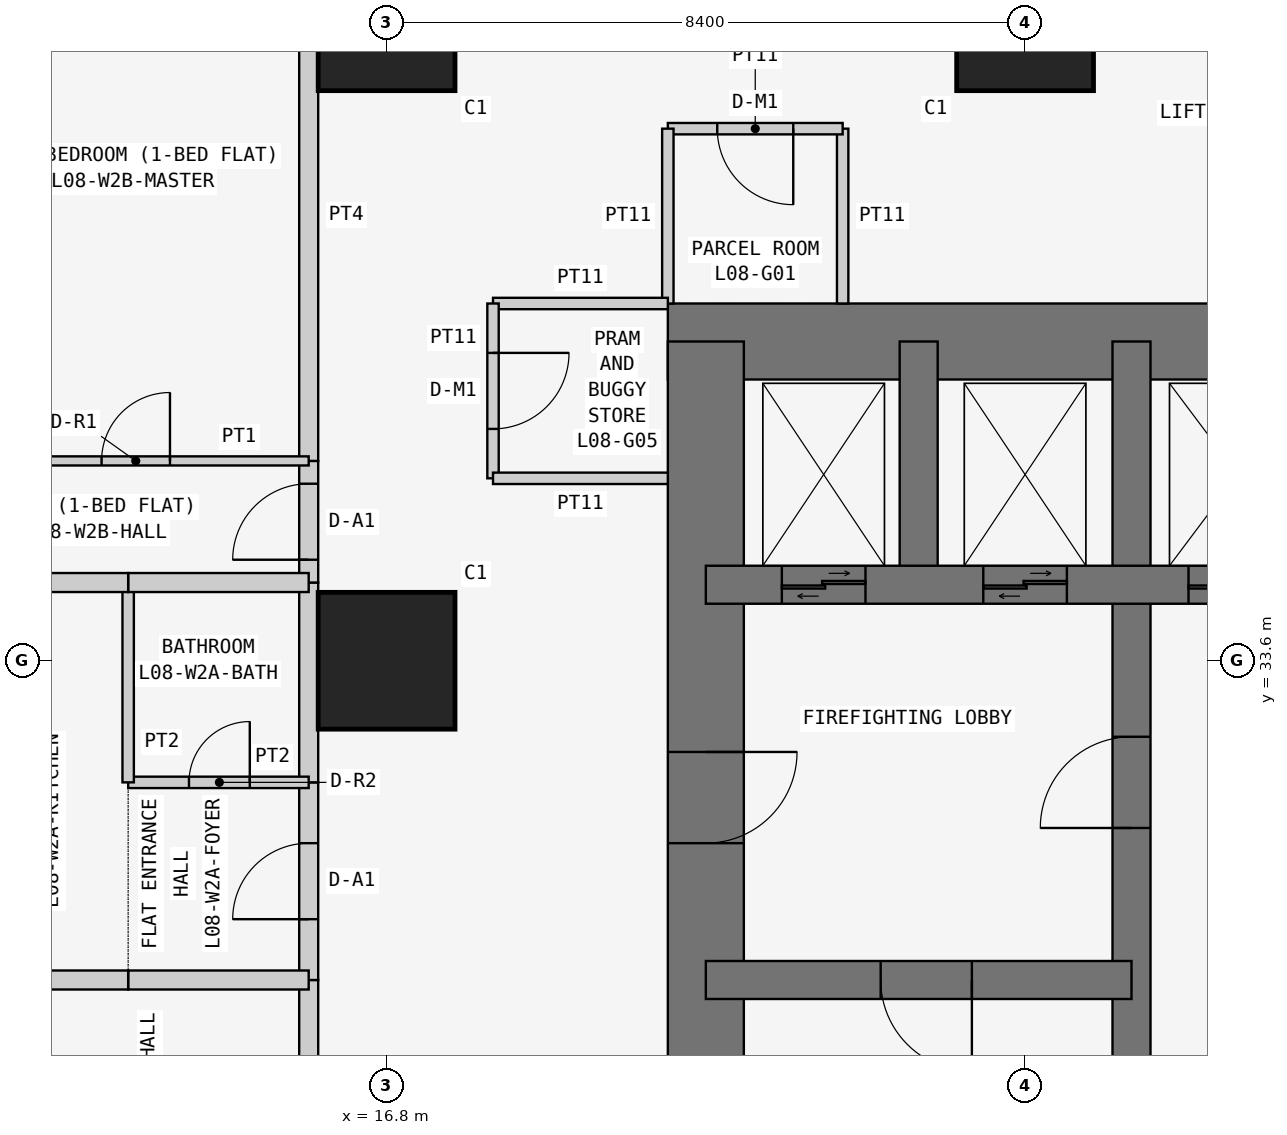
"""IFC4 building model, lengths in metres.
Left out: names, types, materials, properties, quantities, classifications, styles, units other than length and angle.
Written with IfcOpenShell. Run it as: python <this file> out.ifc"""

import sys

from ifc_helpers import new_model, si_unit, direction, frame, frame_2d, origin, origin_2d, place, context, subcontext, project, spatial, rectangle, extrude, element, fill, save


model = new_model("IFC4")
c1 = context("Model", 3, precision=1e-05, world=origin(), true_north=direction((0.0, 1.0)))
c2 = subcontext(c1, "Body", "Model", "MODEL_VIEW")
j1 = project(units=[si_unit("LENGTHUNIT", "METRE"), si_unit("PLANEANGLEUNIT", "RADIAN")], contexts=[c1])
p1 = place(None, origin())
s1 = spatial("IfcSite", under=j1, at=p1, CompositionType="ELEMENT")
p2 = place(p1, origin())
s2 = spatial("IfcBuilding", under=s1, at=p2, CompositionType="ELEMENT")
p3 = place(p2, frame((0.0, 0.0, 38.1)))
s3 = spatial("IfcBuildingStorey", under=s2, at=p3, CompositionType="ELEMENT", Elevation=38.1)
for number, where, z_axis, x_axis in (
    (1, (16.8, 33.6, 0.0), (0.0, 0.0, 1.0), (1.0, 0.0, 0.0)),
    (2, (16.8, 42.0, 0.0), (0.0, 0.0, 1.0), (1.0, 0.0, 0.0)),
    (3, (25.2, 42.0, 0.0), (0.0, 0.0, 1.0), (1.0, 0.0, 0.0)),
):
    element("IfcColumn", number, at=place(p3, frame(where, z_axis=z_axis, x_axis=x_axis)), inside=s3, PredefinedType="COLUMN", context=c2, shape_type="SweptSolid", body=[
        extrude(rectangle(XDim=1.8, YDim=1.8, at=origin_2d()), origin(), (0.0, 0.0, 1.0), 3.6),
    ])
p4 = place(p3, frame((37.8, 37.8, 0.0), z_axis=(0.0, 0.0, 1.0), x_axis=(-1.0, 0.0, 0.0)))
e4 = element("IfcWall", 4, at=p4, inside=s3, PredefinedType="SHEAR", context=c2, shape_type="SweptSolid", body=[
    extrude(rectangle(XDim=17.3, YDim=1.0, at=frame_2d((8.65, 0.0))), origin(), (0.0, 0.0, 1.0), 3.6),
])
p5 = place(p3, frame((21.0, 37.8, 0.0), z_axis=(0.0, 0.0, 1.0), x_axis=(0.0, -1.0, 0.0)))
e5 = element("IfcWall", 5, at=p5, inside=s3, PredefinedType="SHEAR", context=c2, shape_type="SweptSolid", body=[
    extrude(rectangle(XDim=17.3, YDim=1.0, at=frame_2d((8.65, 0.0))), origin(), (0.0, 0.0, 1.0), 3.6),
])
p6 = place(p5, frame((5.4, 0.0, 0.0)))
e6 = element("IfcOpeningElement", 6, at=p6, cuts=e5, PredefinedType="OPENING", context=c2, shape_type="SweptSolid", body=[
    extrude(rectangle(XDim=1.2, YDim=2.1, at=frame_2d((0.6, 1.05))), frame((0.0, 0.51, 0.0), z_axis=(0.0, -1.0, 0.0), x_axis=(1.0, 0.0, 0.0)), (0.0, 0.0, 1.0), 1.02),
])
p7 = place(p3, frame((26.6, 21.0, 0.0), z_axis=(0.0, 0.0, 1.0), x_axis=(0.0, 1.0, 0.0)))
e7 = element("IfcWall", 7, at=p7, inside=s3, PredefinedType="SHEAR", context=c2, shape_type="SweptSolid", body=[
    extrude(rectangle(XDim=16.8, YDim=0.5, at=frame_2d((8.4, 0.0))), origin(), (0.0, 0.0, 1.0), 3.6),
])
p8 = place(p7, frame((10.4, 0.0, 0.0)))
e8 = element("IfcOpeningElement", 8, at=p8, cuts=e7, PredefinedType="OPENING", context=c2, shape_type="SweptSolid", body=[
    extrude(rectangle(XDim=1.2, YDim=2.1, at=frame_2d((0.6, 1.05))), frame((0.0, 0.26, 0.0), z_axis=(0.0, -1.0, 0.0), x_axis=(1.0, 0.0, 0.0)), (0.0, 0.0, 1.0), 0.52),
])
p9 = place(p3, frame((21.0, 29.4, 0.0), z_axis=(0.0, 0.0, 1.0), x_axis=(1.0, 0.0, 0.0)))
e9 = element("IfcWall", 9, at=p9, inside=s3, PredefinedType="SHEAR", context=c2, shape_type="SweptSolid", body=[
    extrude(rectangle(XDim=5.6, YDim=0.5, at=frame_2d((2.8, 0.0))), origin(), (0.0, 0.0, 1.0), 3.6),
])
p10 = place(p9, frame((2.3, 0.0, 0.0)))
e10 = element("IfcOpeningElement", 10, at=p10, cuts=e9, PredefinedType="OPENING", context=c2, shape_type="SweptSolid", body=[
    extrude(rectangle(XDim=1.2, YDim=2.1, at=frame_2d((0.6, 1.05))), frame((0.0, 0.26, 0.0), z_axis=(0.0, -1.0, 0.0), x_axis=(1.0, 0.0, 0.0)), (0.0, 0.0, 1.0), 0.52),
])
p11 = place(p3, frame((21.0, 34.6, 0.0), z_axis=(0.0, 0.0, 1.0), x_axis=(1.0, 0.0, 0.0)))
e11 = element("IfcWall", 11, at=p11, inside=s3, PredefinedType="SHEAR", context=c2, shape_type="SweptSolid", body=[
    extrude(rectangle(XDim=11.2, YDim=0.5, at=frame_2d((5.6, 0.0))), origin(), (0.0, 0.0, 1.0), 3.6),
])
p12 = place(p11, frame((9.35, 0.0, 0.0)))
e12 = element("IfcOpeningElement", 12, at=p12, cuts=e11, PredefinedType="OPENING", context=c2, shape_type="SweptSolid", body=[
    extrude(rectangle(XDim=0.9, YDim=2.1, at=frame_2d((0.45, 1.05))), frame((0.0, 0.26, 0.0), z_axis=(0.0, -1.0, 0.0), x_axis=(1.0, 0.0, 0.0)), (0.0, 0.0, 1.0), 0.52),
])
p13 = place(p11, frame((1.0, 0.0, 0.0)))
e13 = element("IfcOpeningElement", 13, at=p13, cuts=e11, PredefinedType="OPENING", context=c2, shape_type="SweptSolid", body=[
    extrude(rectangle(XDim=1.1, YDim=2.1, at=frame_2d((0.55, 1.05))), frame((0.0, 0.26, 0.0), z_axis=(0.0, -1.0, 0.0), x_axis=(1.0, 0.0, 0.0)), (0.0, 0.0, 1.0), 0.52),
])
p14 = place(p11, frame((3.65, 0.0, 0.0)))
e14 = element("IfcOpeningElement", 14, at=p14, cuts=e11, PredefinedType="OPENING", context=c2, shape_type="SweptSolid", body=[
    extrude(rectangle(XDim=1.1, YDim=2.1, at=frame_2d((0.55, 1.05))), frame((0.0, 0.26, 0.0), z_axis=(0.0, -1.0, 0.0), x_axis=(1.0, 0.0, 0.0)), (0.0, 0.0, 1.0), 0.52),
])
p15 = place(p11, frame((6.35, 0.0, 0.0)))
e15 = element("IfcOpeningElement", 15, at=p15, cuts=e11, PredefinedType="OPENING", context=c2, shape_type="SweptSolid", body=[
    extrude(rectangle(XDim=1.3, YDim=2.1, at=frame_2d((0.65, 1.05))), frame((0.0, 0.26, 0.0), z_axis=(0.0, -1.0, 0.0), x_axis=(1.0, 0.0, 0.0)), (0.0, 0.0, 1.0), 0.52),
])
p16 = place(p3, frame((23.8, 34.6, 0.0), z_axis=(0.0, 0.0, 1.0), x_axis=(0.0, 1.0, 0.0)))
e16 = element("IfcWall", 16, at=p16, inside=s3, PredefinedType="SHEAR", context=c2, shape_type="SweptSolid", body=[
    extrude(rectangle(XDim=3.2, YDim=0.5, at=frame_2d((1.6, 0.0))), origin(), (0.0, 0.0, 1.0), 3.6),
])
p17 = place(p3, frame((22.8, 38.3, 0.0), z_axis=(0.0, 0.0, 1.0), x_axis=(0.0, 1.0, 0.0)))
e17 = element("IfcWall", 17, at=p17, inside=s3, PredefinedType="PARTITIONING", context=c2, shape_type="SweptSolid", body=[
    extrude(rectangle(XDim=2.3, YDim=0.15, at=frame_2d((1.15, 0.0))), origin(), (0.0, 0.0, 1.0), 3.45),
])
p18 = place(p3, frame((22.8, 40.6, 0.0), z_axis=(0.0, 0.0, 1.0), x_axis=(-1.0, 0.0, 0.0)))
e18 = element("IfcWall", 18, at=p18, inside=s3, PredefinedType="PARTITIONING", context=c2, shape_type="SweptSolid", body=[
    extrude(rectangle(XDim=2.3, YDim=0.15, at=frame_2d((1.15, 0.0))), origin(), (0.0, 0.0, 1.0), 3.45),
])
p19 = place(p18, frame((0.65, 0.0, 0.0)))
e19 = element("IfcOpeningElement", 19, at=p19, cuts=e18, PredefinedType="OPENING", context=c2, shape_type="SweptSolid", body=[
    extrude(rectangle(XDim=1.0, YDim=2.1, at=frame_2d((0.5, 1.05))), frame((0.0, 0.085, 0.0), z_axis=(0.0, -1.0, 0.0), x_axis=(1.0, 0.0, 0.0)), (0.0, 0.0, 1.0), 0.17),
])
for number, where, z_axis, x_axis in (
    (20, (20.5, 40.6, 0.0), (0.0, 0.0, 1.0), (0.0, -1.0, 0.0)),
    (21, (20.5, 38.3, 0.0), (0.0, 0.0, 1.0), (-1.0, 0.0, 0.0)),
):
    element("IfcWall", number, at=place(p3, frame(where, z_axis=z_axis, x_axis=x_axis)), inside=s3, PredefinedType="PARTITIONING", context=c2, shape_type="SweptSolid", body=[
        extrude(rectangle(XDim=2.3, YDim=0.15, at=frame_2d((1.15, 0.0))), origin(), (0.0, 0.0, 1.0), 3.45),
    ])
p20 = place(p3, frame((18.2, 38.3, 0.0), z_axis=(0.0, 0.0, 1.0), x_axis=(0.0, -1.0, 0.0)))
e22 = element("IfcWall", 22, at=p20, inside=s3, PredefinedType="PARTITIONING", context=c2, shape_type="SweptSolid", body=[
    extrude(rectangle(XDim=2.3, YDim=0.15, at=frame_2d((1.15, 0.0))), origin(), (0.0, 0.0, 1.0), 3.45),
])
p21 = place(p20, frame((0.65, 0.0, 0.0)))
e23 = element("IfcOpeningElement", 23, at=p21, cuts=e22, PredefinedType="OPENING", context=c2, shape_type="SweptSolid", body=[
    extrude(rectangle(XDim=1.0, YDim=2.1, at=frame_2d((0.5, 1.05))), frame((0.0, 0.085, 0.0), z_axis=(0.0, -1.0, 0.0), x_axis=(1.0, 0.0, 0.0)), (0.0, 0.0, 1.0), 0.17),
])
p22 = place(p3, frame((18.2, 36.0, 0.0), z_axis=(0.0, 0.0, 1.0), x_axis=(1.0, 0.0, 0.0)))
e24 = element("IfcWall", 24, at=p22, inside=s3, PredefinedType="PARTITIONING", context=c2, shape_type="SweptSolid", body=[
    extrude(rectangle(XDim=2.3, YDim=0.15, at=frame_2d((1.15, 0.0))), origin(), (0.0, 0.0, 1.0), 3.45),
])
p23 = place(p3, frame((15.775, 24.171, 0.0), z_axis=(0.0, 0.0, 1.0), x_axis=(0.0, 1.0, 0.0)))
e25 = element("IfcWall", 25, at=p23, inside=s3, PredefinedType="PARTITIONING", context=c2, shape_type="SweptSolid", body=[
    extrude(rectangle(XDim=5.229, YDim=0.25, at=frame_2d((2.615, 0.0))), origin(), (0.0, 0.0, 1.0), 3.45),
])
p24 = place(p23, frame((2.129, 0.0, 0.0)))
e26 = element("IfcOpeningElement", 26, at=p24, cuts=e25, PredefinedType="OPENING", context=c2, shape_type="SweptSolid", body=[
    extrude(rectangle(XDim=1.0, YDim=2.1, at=frame_2d((0.5, 1.05))), frame((0.0, 0.135, 0.0), z_axis=(0.0, -1.0, 0.0), x_axis=(1.0, 0.0, 0.0)), (0.0, 0.0, 1.0), 0.27),
])
p25 = place(p3, frame((15.775, 29.4, 0.0), z_axis=(0.0, 0.0, 1.0), x_axis=(0.0, 1.0, 0.0)))
e27 = element("IfcWall", 27, at=p25, inside=s3, PredefinedType="PARTITIONING", context=c2, shape_type="SweptSolid", body=[
    extrude(rectangle(XDim=2.6, YDim=0.25, at=frame_2d((1.3, 0.0))), origin(), (0.0, 0.0, 1.0), 3.45),
])
p26 = place(p25, frame((0.8, 0.0, 0.0)))
e28 = element("IfcOpeningElement", 28, at=p26, cuts=e27, PredefinedType="OPENING", context=c2, shape_type="SweptSolid", body=[
    extrude(rectangle(XDim=1.0, YDim=2.1, at=frame_2d((0.5, 1.05))), frame((0.0, 0.135, 0.0), z_axis=(0.0, -1.0, 0.0), x_axis=(1.0, 0.0, 0.0)), (0.0, 0.0, 1.0), 0.27),
])
p27 = place(p3, frame((15.775, 32.0, 0.0), z_axis=(0.0, 0.0, 1.0), x_axis=(0.0, 1.0, 0.0)))
e29 = element("IfcWall", 29, at=p27, inside=s3, PredefinedType="PARTITIONING", context=c2, shape_type="SweptSolid", body=[
    extrude(rectangle(XDim=2.629, YDim=0.25, at=frame_2d((1.314, 0.0))), origin(), (0.0, 0.0, 1.0), 3.45),
])
p28 = place(p3, frame((15.775, 34.629, 0.0), z_axis=(0.0, 0.0, 1.0), x_axis=(0.0, 1.0, 0.0)))
e30 = element("IfcWall", 30, at=p28, inside=s3, PredefinedType="PARTITIONING", context=c2, shape_type="SweptSolid", body=[
    extrude(rectangle(XDim=1.6, YDim=0.25, at=frame_2d((0.8, 0.0))), origin(), (0.0, 0.0, 1.0), 3.45),
])
p29 = place(p28, frame((0.3, 0.0, 0.0)))
e31 = element("IfcOpeningElement", 31, at=p29, cuts=e30, PredefinedType="OPENING", context=c2, shape_type="SweptSolid", body=[
    extrude(rectangle(XDim=1.0, YDim=2.1, at=frame_2d((0.5, 1.05))), frame((0.0, 0.135, 0.0), z_axis=(0.0, -1.0, 0.0), x_axis=(1.0, 0.0, 0.0)), (0.0, 0.0, 1.0), 0.27),
])
p30 = place(p3, frame((15.775, 36.229, 0.0), z_axis=(0.0, 0.0, 1.0), x_axis=(0.0, 1.0, 0.0)))
e32 = element("IfcWall", 32, at=p30, inside=s3, PredefinedType="PARTITIONING", context=c2, shape_type="SweptSolid", body=[
    extrude(rectangle(XDim=6.471, YDim=0.25, at=frame_2d((3.235, 0.0))), origin(), (0.0, 0.0, 1.0), 3.45),
])
p31 = place(p3, frame((15.775, 29.4, 0.0), z_axis=(0.0, 0.0, 1.0), x_axis=(-1.0, 0.0, 0.0)))
e33 = element("IfcWall", 33, at=p31, inside=s3, PredefinedType="PARTITIONING", context=c2, shape_type="SweptSolid", body=[
    extrude(rectangle(XDim=2.375, YDim=0.25, at=frame_2d((1.188, 0.0))), origin(), (0.0, 0.0, 1.0), 3.45),
])
p32 = place(p3, frame((13.4, 29.4, 0.0), z_axis=(0.0, 0.0, 1.0), x_axis=(-1.0, 0.0, 0.0)))
e34 = element("IfcWall", 34, at=p32, inside=s3, PredefinedType="PARTITIONING", context=c2, shape_type="SweptSolid", body=[
    extrude(rectangle(XDim=1.2, YDim=0.25, at=frame_2d((0.6, 0.0))), origin(), (0.0, 0.0, 1.0), 3.45),
])
p33 = place(p3, frame((13.4, 32.0, 0.0), z_axis=(0.0, 0.0, 1.0), x_axis=(1.0, 0.0, 0.0)))
e35 = element("IfcWall", 35, at=p33, inside=s3, PredefinedType="PARTITIONING", context=c2, shape_type="SweptSolid", body=[
    extrude(rectangle(XDim=2.375, YDim=0.15, at=frame_2d((1.188, 0.0))), origin(), (0.0, 0.0, 1.0), 3.45),
])
p34 = place(p33, frame((0.8, 0.0, 0.0)))
e36 = element("IfcOpeningElement", 36, at=p34, cuts=e35, PredefinedType="OPENING", context=c2, shape_type="SweptSolid", body=[
    extrude(rectangle(XDim=0.8, YDim=2.1, at=frame_2d((0.4, 1.05))), frame((0.0, 0.085, 0.0), z_axis=(0.0, -1.0, 0.0), x_axis=(1.0, 0.0, 0.0)), (0.0, 0.0, 1.0), 0.17),
])
p35 = place(p3, frame((13.4, 32.0, 0.0), z_axis=(0.0, 0.0, 1.0), x_axis=(0.0, 1.0, 0.0)))
e37 = element("IfcWall", 37, at=p35, inside=s3, PredefinedType="PARTITIONING", context=c2, shape_type="SweptSolid", body=[
    extrude(rectangle(XDim=2.629, YDim=0.15, at=frame_2d((1.314, 0.0))), origin(), (0.0, 0.0, 1.0), 3.45),
])
p36 = place(p3, frame((13.4, 34.629, 0.0), z_axis=(0.0, 0.0, 1.0), x_axis=(1.0, 0.0, 0.0)))
e38 = element("IfcWall", 38, at=p36, inside=s3, PredefinedType="PARTITIONING", context=c2, shape_type="SweptSolid", body=[
    extrude(rectangle(XDim=2.375, YDim=0.25, at=frame_2d((1.188, 0.0))), origin(), (0.0, 0.0, 1.0), 3.45),
])
p37 = place(p3, frame((11.0, 34.629, 0.0), z_axis=(0.0, 0.0, 1.0), x_axis=(1.0, 0.0, 0.0)))
e39 = element("IfcWall", 39, at=p37, inside=s3, PredefinedType="PARTITIONING", context=c2, shape_type="SweptSolid", body=[
    extrude(rectangle(XDim=2.4, YDim=0.25, at=frame_2d((1.2, 0.0))), origin(), (0.0, 0.0, 1.0), 3.45),
])
p38 = place(p3, frame((11.2, 36.229, 0.0), z_axis=(0.0, 0.0, 1.0), x_axis=(1.0, 0.0, 0.0)))
e40 = element("IfcWall", 40, at=p38, inside=s3, PredefinedType="PARTITIONING", context=c2, shape_type="SweptSolid", body=[
    extrude(rectangle(XDim=4.575, YDim=0.12, at=frame_2d((2.288, 0.0))), origin(), (0.0, 0.0, 1.0), 3.45),
])
p39 = place(p38, frame((1.85, 0.0, 0.0)))
e41 = element("IfcOpeningElement", 41, at=p39, cuts=e40, PredefinedType="OPENING", context=c2, shape_type="SweptSolid", body=[
    extrude(rectangle(XDim=0.9, YDim=2.1, at=frame_2d((0.45, 1.05))), frame((0.0, 0.07, 0.0), z_axis=(0.0, -1.0, 0.0), x_axis=(1.0, 0.0, 0.0)), (0.0, 0.0, 1.0), 0.14),
])
p40 = place(p19, origin())
e42 = element("IfcDoor", 42, at=p40, inside=s3, OperationType="SINGLE_SWING_LEFT", PredefinedType="DOOR", context=c2, shape_type="SweptSolid", body=[
    extrude(rectangle(XDim=1.0, YDim=2.1, at=frame_2d((0.5, 1.05))), frame((0.0, 0.025, 0.0), z_axis=(0.0, -1.0, 0.0), x_axis=(1.0, 0.0, 0.0)), (0.0, 0.0, 1.0), 0.05),
])
fill(e19, e42)
p41 = place(p21, origin())
e43 = element("IfcDoor", 43, at=p41, inside=s3, OperationType="SINGLE_SWING_LEFT", PredefinedType="DOOR", context=c2, shape_type="SweptSolid", body=[
    extrude(rectangle(XDim=1.0, YDim=2.1, at=frame_2d((0.5, 1.05))), frame((0.0, 0.025, 0.0), z_axis=(0.0, -1.0, 0.0), x_axis=(1.0, 0.0, 0.0)), (0.0, 0.0, 1.0), 0.05),
])
fill(e23, e43)
p42 = place(p26, origin())
e44 = element("IfcDoor", 44, at=p42, inside=s3, OperationType="SINGLE_SWING_LEFT", PredefinedType="DOOR", context=c2, shape_type="SweptSolid", body=[
    extrude(rectangle(XDim=1.0, YDim=2.1, at=frame_2d((0.5, 1.05))), frame((0.0, 0.025, 0.0), z_axis=(0.0, -1.0, 0.0), x_axis=(1.0, 0.0, 0.0)), (0.0, 0.0, 1.0), 0.05),
])
fill(e28, e44)
p43 = place(p34, origin())
e45 = element("IfcDoor", 45, at=p43, inside=s3, OperationType="SINGLE_SWING_RIGHT", PredefinedType="DOOR", context=c2, shape_type="SweptSolid", body=[
    extrude(rectangle(XDim=0.8, YDim=2.1, at=frame_2d((0.4, 1.05))), frame((0.0, 0.025, 0.0), z_axis=(0.0, -1.0, 0.0), x_axis=(1.0, 0.0, 0.0)), (0.0, 0.0, 1.0), 0.05),
])
fill(e36, e45)
p44 = place(p29, origin())
e46 = element("IfcDoor", 46, at=p44, inside=s3, OperationType="SINGLE_SWING_LEFT", PredefinedType="DOOR", context=c2, shape_type="SweptSolid", body=[
    extrude(rectangle(XDim=1.0, YDim=2.1, at=frame_2d((0.5, 1.05))), frame((0.0, 0.025, 0.0), z_axis=(0.0, -1.0, 0.0), x_axis=(1.0, 0.0, 0.0)), (0.0, 0.0, 1.0), 0.05),
])
fill(e31, e46)
p45 = place(p39, origin())
e47 = element("IfcDoor", 47, at=p45, inside=s3, OperationType="SINGLE_SWING_RIGHT", PredefinedType="DOOR", context=c2, shape_type="SweptSolid", body=[
    extrude(rectangle(XDim=0.9, YDim=2.1, at=frame_2d((0.45, 1.05))), frame((0.0, 0.025, 0.0), z_axis=(0.0, -1.0, 0.0), x_axis=(1.0, 0.0, 0.0)), (0.0, 0.0, 1.0), 0.05),
])
fill(e41, e47)
p46 = place(p6, origin())
e48 = element("IfcDoor", 48, at=p46, inside=s3, OperationType="SINGLE_SWING_LEFT", PredefinedType="DOOR", context=c2, shape_type="SweptSolid", body=[
    extrude(rectangle(XDim=1.2, YDim=2.1, at=frame_2d((0.6, 1.05))), frame((0.0, 0.025, 0.0), z_axis=(0.0, -1.0, 0.0), x_axis=(1.0, 0.0, 0.0)), (0.0, 0.0, 1.0), 0.05),
])
fill(e6, e48)
p47 = place(p10, frame((1.2, 0.0, 0.0), z_axis=(0.0, 0.0, 1.0), x_axis=(-1.0, 0.0, 0.0)))
e49 = element("IfcDoor", 49, at=p47, inside=s3, OperationType="SINGLE_SWING_LEFT", PredefinedType="DOOR", context=c2, shape_type="SweptSolid", body=[
    extrude(rectangle(XDim=1.2, YDim=2.1, at=frame_2d((0.6, 1.05))), frame((0.0, 0.025, 0.0), z_axis=(0.0, -1.0, 0.0), x_axis=(1.0, 0.0, 0.0)), (0.0, 0.0, 1.0), 0.05),
])
fill(e10, e49)
p48 = place(p8, origin())
e50 = element("IfcDoor", 50, at=p48, inside=s3, OperationType="SINGLE_SWING_LEFT", PredefinedType="DOOR", context=c2, shape_type="SweptSolid", body=[
    extrude(rectangle(XDim=1.2, YDim=2.1, at=frame_2d((0.6, 1.05))), frame((0.0, 0.025, 0.0), z_axis=(0.0, -1.0, 0.0), x_axis=(1.0, 0.0, 0.0)), (0.0, 0.0, 1.0), 0.05),
])
fill(e8, e50)
p49 = place(p13, origin())
e51 = element("IfcDoor", 51, at=p49, inside=s3, OperationType="DOUBLE_DOOR_SLIDING", PredefinedType="DOOR", context=c2, shape_type="SweptSolid", body=[
    extrude(rectangle(XDim=1.1, YDim=2.1, at=frame_2d((0.55, 1.05))), frame((0.0, 0.025, 0.0), z_axis=(0.0, -1.0, 0.0), x_axis=(1.0, 0.0, 0.0)), (0.0, 0.0, 1.0), 0.05),
])
fill(e13, e51)
p50 = place(p14, origin())
e52 = element("IfcDoor", 52, at=p50, inside=s3, OperationType="DOUBLE_DOOR_SLIDING", PredefinedType="DOOR", context=c2, shape_type="SweptSolid", body=[
    extrude(rectangle(XDim=1.1, YDim=2.1, at=frame_2d((0.55, 1.05))), frame((0.0, 0.025, 0.0), z_axis=(0.0, -1.0, 0.0), x_axis=(1.0, 0.0, 0.0)), (0.0, 0.0, 1.0), 0.05),
])
fill(e14, e52)
p51 = place(p15, origin())
e53 = element("IfcDoor", 53, at=p51, inside=s3, OperationType="DOUBLE_DOOR_SLIDING", PredefinedType="DOOR", context=c2, shape_type="SweptSolid", body=[
    extrude(rectangle(XDim=1.3, YDim=2.1, at=frame_2d((0.65, 1.05))), frame((0.0, 0.025, 0.0), z_axis=(0.0, -1.0, 0.0), x_axis=(1.0, 0.0, 0.0)), (0.0, 0.0, 1.0), 0.05),
])
fill(e15, e53)
save(model, sys.argv[1])
